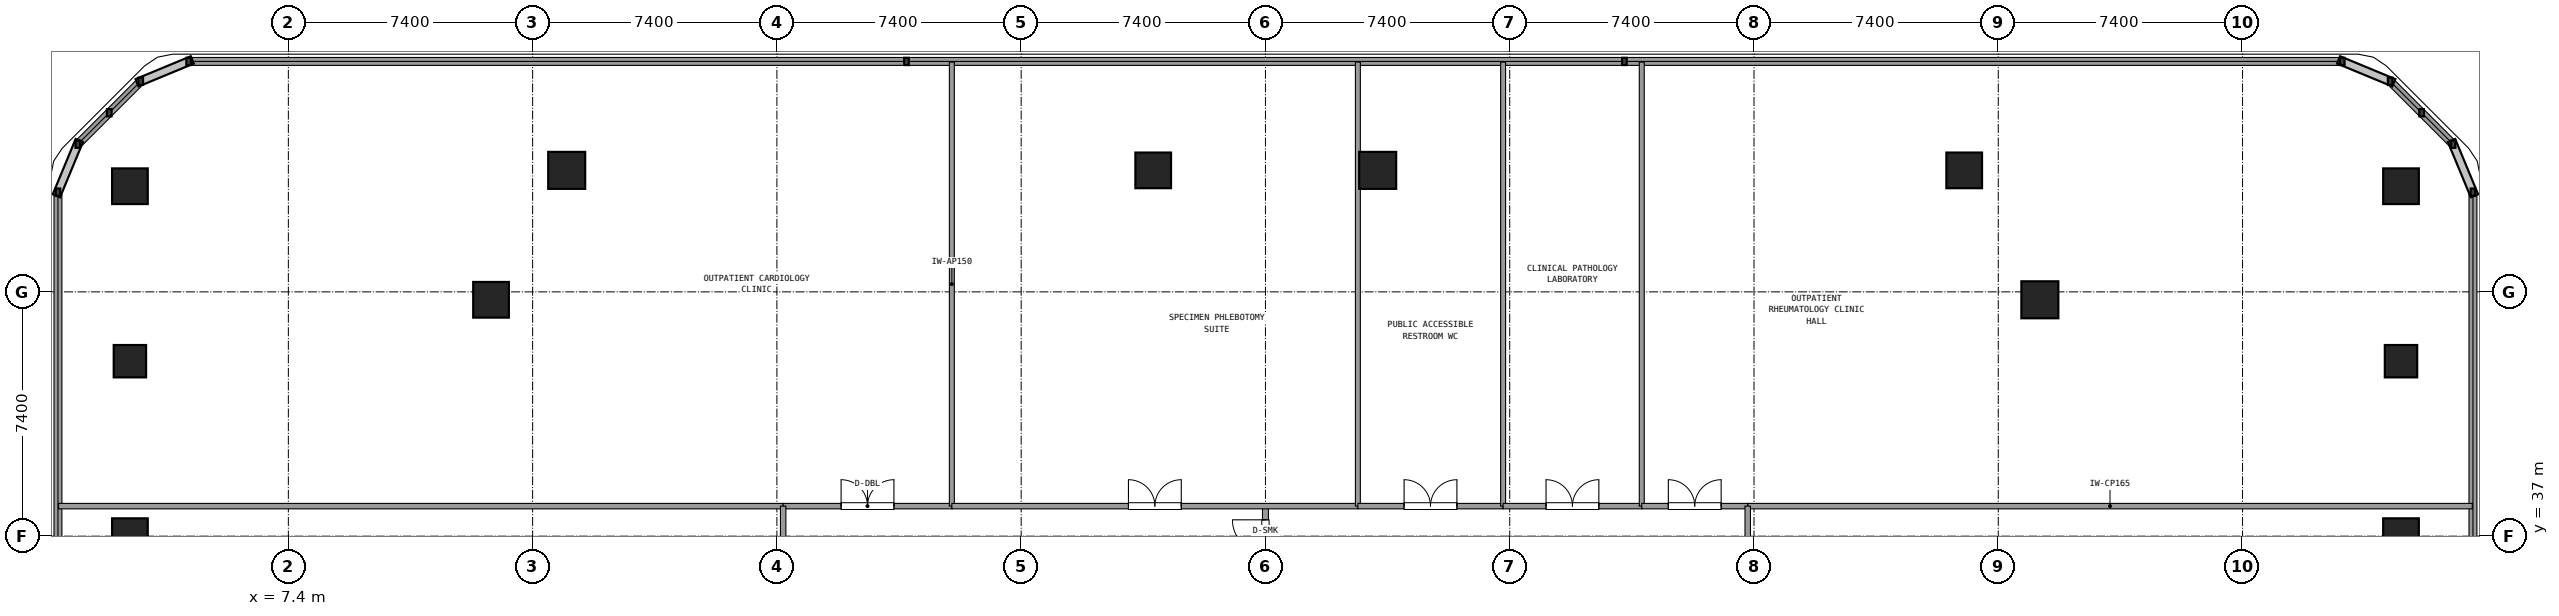
"""IFC4 building model, lengths in metres.
Left out: names, types, materials, properties, quantities, classifications, styles, units other than length and angle.
Written with IfcOpenShell. Run it as: python <this file> out.ifc"""

import sys

from ifc_helpers import new_model, si_unit, direction, frame, frame_2d, origin, origin_2d, place, context, subcontext, project, spatial, rectangle, circle, extrude, element, fill, save


model = new_model("IFC4")
c1 = context("Model", 3, precision=1e-05, world=origin(), true_north=direction((0.0, 1.0)))
c2 = subcontext(c1, "Body", "Model", "MODEL_VIEW")
j1 = project(units=[si_unit("LENGTHUNIT", "METRE"), si_unit("PLANEANGLEUNIT", "RADIAN")], contexts=[c1])
p1 = place(None, origin())
s1 = spatial("IfcSite", under=j1, at=p1, CompositionType="ELEMENT")
p2 = place(p1, origin())
s2 = spatial("IfcBuilding", under=s1, at=p2, CompositionType="ELEMENT")
p3 = place(p2, frame((0.0, 0.0, 5.4)))
s3 = spatial("IfcBuildingStorey", under=s2, at=p3, CompositionType="ELEMENT", Elevation=5.4)
p4 = place(p3, frame((60.46, 44.16, 0.0), z_axis=(0.0, 0.0, 1.0), x_axis=(1.0, 0.0, 0.0)))
e1 = element("IfcColumn", 1, at=p4, inside=s3, PredefinedType="COLUMN", context=c2, shape_type="SweptSolid", body=[
    extrude(circle(Radius=0.56, at=origin_2d()), origin(), (0.0, 0.0, 1.0), 4.5),
])
p5 = place(p3, frame((58.168, 48.08, 0.0), z_axis=(0.0, 0.0, 1.0), x_axis=(1.0, 0.0, 0.0)))
e2 = element("IfcColumn", 2, at=p5, inside=s3, PredefinedType="COLUMN", context=c2, shape_type="SweptSolid", body=[
    extrude(rectangle(XDim=1.08, YDim=1.08, at=origin_2d()), origin(), (0.0, 0.0, 1.0), 4.5),
])
p6 = place(p3, frame((40.4, 48.08, 0.0), z_axis=(0.0, 0.0, 1.0), x_axis=(1.0, 0.0, 0.0)))
e3 = element("IfcColumn", 3, at=p6, inside=s3, PredefinedType="COLUMN", context=c2, shape_type="SweptSolid", body=[
    extrude(circle(Radius=0.56, at=origin_2d()), origin(), (0.0, 0.0, 1.0), 4.5),
])
p7 = place(p3, frame((33.6, 48.08, 0.0), z_axis=(0.0, 0.0, 1.0), x_axis=(1.0, 0.0, 0.0)))
e4 = element("IfcColumn", 4, at=p7, inside=s3, PredefinedType="COLUMN", context=c2, shape_type="SweptSolid", body=[
    extrude(rectangle(XDim=1.08, YDim=1.08, at=origin_2d()), origin(), (0.0, 0.0, 1.0), 4.5),
])
p8 = place(p3, frame((15.832, 48.08, 0.0), z_axis=(0.0, 0.0, 1.0), x_axis=(1.0, 0.0, 0.0)))
e5 = element("IfcColumn", 5, at=p8, inside=s3, PredefinedType="COLUMN", context=c2, shape_type="SweptSolid", body=[
    extrude(circle(Radius=0.56, at=origin_2d()), origin(), (0.0, 0.0, 1.0), 4.5),
])
for number, where, z_axis, x_axis in (
    (6, (13.54, 44.16, 0.0), (0.0, 0.0, 1.0), (1.0, 0.0, 0.0)),
    (7, (2.6, 37.0, 0.0), (0.0, 0.0, 1.0), (1.0, 0.0, 0.0)),
    (8, (2.6, 47.6, 0.0), (0.0, 0.0, 1.0), (1.0, 0.0, 0.0)),
    (9, (71.4, 37.0, 0.0), (0.0, 0.0, 1.0), (1.0, 0.0, 0.0)),
    (10, (71.4, 47.6, 0.0), (0.0, 0.0, 1.0), (1.0, 0.0, 0.0)),
):
    element("IfcColumn", number, at=place(p3, frame(where, z_axis=z_axis, x_axis=x_axis)), inside=s3, PredefinedType="COLUMN", context=c2, shape_type="SweptSolid", body=[
        extrude(rectangle(XDim=1.08, YDim=1.08, at=origin_2d()), origin(), (0.0, 0.0, 1.0), 4.5),
    ])
for number, where, z_axis, x_axis in (
    (11, (2.6, 42.3, 0.0), (0.0, 0.0, 1.0), (1.0, 0.0, 0.0)),
    (12, (71.4, 42.3, 0.0), (0.0, 0.0, 1.0), (1.0, 0.0, 0.0)),
):
    element("IfcColumn", number, at=place(p3, frame(where, z_axis=z_axis, x_axis=x_axis)), inside=s3, PredefinedType="PILASTER", context=c2, shape_type="SweptSolid", body=[
        extrude(circle(Radius=0.49, at=origin_2d()), origin(), (0.0, 0.0, 1.0), 4.5),
    ])
p9 = place(p3, frame((73.58, 4.379, 0.0), z_axis=(0.0, 0.0, 1.0), x_axis=(0.0, 1.0, 0.0)))
e13 = element("IfcWall", 13, at=p9, inside=s3, PredefinedType="SOLIDWALL", context=c2, shape_type="SweptSolid", body=[
    extrude(rectangle(XDim=43.042, YDim=0.24, at=frame_2d((21.521, 0.0))), origin(), (0.0, 0.0, 1.0), 0.85),
])
p10 = place(p3, frame((72.979, 48.872, 0.0), z_axis=(0.0, 0.0, 1.0), x_axis=(-0.707106781187, 0.707106781187, 0.0)))
e14 = element("IfcWall", 14, at=p10, inside=s3, PredefinedType="SOLIDWALL", context=c2, shape_type="SweptSolid", body=[
    extrude(rectangle(XDim=2.697, YDim=0.24, at=frame_2d((1.348, 0.0))), origin(), (0.0, 0.0, 1.0), 0.85),
])
p11 = place(p3, frame((69.621, 51.38, 0.0), z_axis=(0.0, 0.0, 1.0), x_axis=(-1.0, 0.0, 0.0)))
e15 = element("IfcWall", 15, at=p11, inside=s3, PredefinedType="SOLIDWALL", context=c2, shape_type="SweptSolid", body=[
    extrude(rectangle(XDim=65.242, YDim=0.24, at=frame_2d((32.621, 0.0))), origin(), (0.0, 0.0, 1.0), 0.85),
])
p12 = place(p3, frame((2.928, 50.779, 0.0), z_axis=(0.0, 0.0, 1.0), x_axis=(-0.707106781187, -0.707106781187, 0.0)))
e16 = element("IfcWall", 16, at=p12, inside=s3, PredefinedType="SOLIDWALL", context=c2, shape_type="SweptSolid", body=[
    extrude(rectangle(XDim=2.697, YDim=0.24, at=frame_2d((1.348, 0.0))), origin(), (0.0, 0.0, 1.0), 0.85),
])
p13 = place(p3, frame((0.42, 47.421, 0.0), z_axis=(0.0, 0.0, 1.0), x_axis=(0.0, -1.0, 0.0)))
e17 = element("IfcWall", 17, at=p13, inside=s3, PredefinedType="SOLIDWALL", context=c2, shape_type="SweptSolid", body=[
    extrude(rectangle(XDim=43.042, YDim=0.24, at=frame_2d((21.521, 0.0))), origin(), (0.0, 0.0, 1.0), 0.85),
])
p14 = place(p3, frame((37.0, 35.08, 0.0), z_axis=(0.0, 0.0, 1.0), x_axis=(0.0, 1.0, 0.0)))
e18 = element("IfcWall", 18, at=p14, inside=s3, PredefinedType="PARTITIONING", context=c2, shape_type="SweptSolid", body=[
    extrude(rectangle(XDim=2.83, YDim=0.18, at=frame_2d((1.415, 0.0))), origin(), (0.0, 0.0, 1.0), 3.21),
])
p15 = place(p14, frame((0.415, 0.0, 0.0)))
e19 = element("IfcOpeningElement", 19, at=p15, cuts=e18, PredefinedType="OPENING", context=c2, shape_type="SweptSolid", body=[
    extrude(rectangle(XDim=2.0, YDim=2.2, at=frame_2d((1.0, 1.1))), frame((0.0, 0.1, 0.0), z_axis=(0.0, -1.0, 0.0), x_axis=(1.0, 0.0, 0.0)), (0.0, 0.0, 1.0), 0.2),
])
for number, where, z_axis, x_axis in (
    (20, (0.44, 37.91, 0.0), (0.0, 0.0, 1.0), (1.0, 0.0, 0.0)),
    (21, (51.61, 37.91, 0.0), (0.0, 0.0, 1.0), (1.0, 0.0, 0.0)),
):
    element("IfcWall", number, at=place(p3, frame(where, z_axis=z_axis, x_axis=x_axis)), inside=s3, PredefinedType="PARTITIONING", context=c2, shape_type="SweptSolid", body=[
        extrude(rectangle(XDim=21.95, YDim=0.165, at=frame_2d((10.975, 0.0))), origin(), (0.0, 0.0, 1.0), 3.21),
    ])
p16 = place(p3, frame((22.39, 37.91, 0.0), z_axis=(0.0, 0.0, 1.0), x_axis=(1.0, 0.0, 0.0)))
e22 = element("IfcWall", 22, at=p16, inside=s3, PredefinedType="PARTITIONING", context=c2, shape_type="SweptSolid", body=[
    extrude(rectangle(XDim=5.11, YDim=0.165, at=frame_2d((2.555, 0.0))), origin(), (0.0, 0.0, 1.0), 3.21),
])
p17 = place(p16, frame((1.755, 0.0, 0.0)))
e23 = element("IfcOpeningElement", 23, at=p17, cuts=e22, PredefinedType="OPENING", context=c2, shape_type="SweptSolid", body=[
    extrude(rectangle(XDim=1.6, YDim=2.2, at=frame_2d((0.8, 1.1))), frame((0.0, 0.093, 0.0), z_axis=(0.0, -1.0, 0.0), x_axis=(1.0, 0.0, 0.0)), (0.0, 0.0, 1.0), 0.185),
])
p18 = place(p3, frame((27.5, 37.91, 0.0), z_axis=(0.0, 0.0, 1.0), x_axis=(0.0, 1.0, 0.0)))
e24 = element("IfcWall", 24, at=p18, inside=s3, PredefinedType="PARTITIONING", context=c2, shape_type="SweptSolid", body=[
    extrude(rectangle(XDim=13.45, YDim=0.15, at=frame_2d((6.725, 0.0))), origin(), (0.0, 0.0, 1.0), 3.21),
])
p19 = place(p3, frame((27.5, 37.91, 0.0), z_axis=(0.0, 0.0, 1.0), x_axis=(1.0, 0.0, 0.0)))
e25 = element("IfcWall", 25, at=p19, inside=s3, PredefinedType="PARTITIONING", context=c2, shape_type="SweptSolid", body=[
    extrude(rectangle(XDim=12.3, YDim=0.165, at=frame_2d((6.15, 0.0))), origin(), (0.0, 0.0, 1.0), 3.21),
])
p20 = place(p19, frame((5.35, 0.0, 0.0)))
e26 = element("IfcOpeningElement", 26, at=p20, cuts=e25, PredefinedType="OPENING", context=c2, shape_type="SweptSolid", body=[
    extrude(rectangle(XDim=1.6, YDim=2.2, at=frame_2d((0.8, 1.1))), frame((0.0, 0.093, 0.0), z_axis=(0.0, -1.0, 0.0), x_axis=(1.0, 0.0, 0.0)), (0.0, 0.0, 1.0), 0.185),
])
p21 = place(p3, frame((39.8, 37.91, 0.0), z_axis=(0.0, 0.0, 1.0), x_axis=(0.0, 1.0, 0.0)))
e27 = element("IfcWall", 27, at=p21, inside=s3, PredefinedType="PARTITIONING", context=c2, shape_type="SweptSolid", body=[
    extrude(rectangle(XDim=13.45, YDim=0.15, at=frame_2d((6.725, 0.0))), origin(), (0.0, 0.0, 1.0), 3.21),
])
p22 = place(p3, frame((39.8, 37.91, 0.0), z_axis=(0.0, 0.0, 1.0), x_axis=(1.0, 0.0, 0.0)))
e28 = element("IfcWall", 28, at=p22, inside=s3, PredefinedType="PARTITIONING", context=c2, shape_type="SweptSolid", body=[
    extrude(rectangle(XDim=4.4, YDim=0.165, at=frame_2d((2.2, 0.0))), origin(), (0.0, 0.0, 1.0), 3.21),
])
p23 = place(p22, frame((1.4, 0.0, 0.0)))
e29 = element("IfcOpeningElement", 29, at=p23, cuts=e28, PredefinedType="OPENING", context=c2, shape_type="SweptSolid", body=[
    extrude(rectangle(XDim=1.6, YDim=2.2, at=frame_2d((0.8, 1.1))), frame((0.0, 0.093, 0.0), z_axis=(0.0, -1.0, 0.0), x_axis=(1.0, 0.0, 0.0)), (0.0, 0.0, 1.0), 0.185),
])
p24 = place(p3, frame((44.2, 37.91, 0.0), z_axis=(0.0, 0.0, 1.0), x_axis=(0.0, 1.0, 0.0)))
e30 = element("IfcWall", 30, at=p24, inside=s3, PredefinedType="PARTITIONING", context=c2, shape_type="SweptSolid", body=[
    extrude(rectangle(XDim=13.45, YDim=0.15, at=frame_2d((6.725, 0.0))), origin(), (0.0, 0.0, 1.0), 3.21),
])
p25 = place(p3, frame((44.2, 37.91, 0.0), z_axis=(0.0, 0.0, 1.0), x_axis=(1.0, 0.0, 0.0)))
e31 = element("IfcWall", 31, at=p25, inside=s3, PredefinedType="PARTITIONING", context=c2, shape_type="SweptSolid", body=[
    extrude(rectangle(XDim=4.2, YDim=0.165, at=frame_2d((2.1, 0.0))), origin(), (0.0, 0.0, 1.0), 3.21),
])
p26 = place(p25, frame((1.3, 0.0, 0.0)))
e32 = element("IfcOpeningElement", 32, at=p26, cuts=e31, PredefinedType="OPENING", context=c2, shape_type="SweptSolid", body=[
    extrude(rectangle(XDim=1.6, YDim=2.2, at=frame_2d((0.8, 1.1))), frame((0.0, 0.093, 0.0), z_axis=(0.0, -1.0, 0.0), x_axis=(1.0, 0.0, 0.0)), (0.0, 0.0, 1.0), 0.185),
])
p27 = place(p3, frame((48.4, 37.91, 0.0), z_axis=(0.0, 0.0, 1.0), x_axis=(0.0, 1.0, 0.0)))
e33 = element("IfcWall", 33, at=p27, inside=s3, PredefinedType="PARTITIONING", context=c2, shape_type="SweptSolid", body=[
    extrude(rectangle(XDim=13.45, YDim=0.15, at=frame_2d((6.725, 0.0))), origin(), (0.0, 0.0, 1.0), 3.21),
])
p28 = place(p3, frame((48.4, 37.91, 0.0), z_axis=(0.0, 0.0, 1.0), x_axis=(1.0, 0.0, 0.0)))
e34 = element("IfcWall", 34, at=p28, inside=s3, PredefinedType="PARTITIONING", context=c2, shape_type="SweptSolid", body=[
    extrude(rectangle(XDim=3.21, YDim=0.165, at=frame_2d((1.605, 0.0))), origin(), (0.0, 0.0, 1.0), 3.21),
])
p29 = place(p28, frame((0.805, 0.0, 0.0)))
e35 = element("IfcOpeningElement", 35, at=p29, cuts=e34, PredefinedType="OPENING", context=c2, shape_type="SweptSolid", body=[
    extrude(rectangle(XDim=1.6, YDim=2.2, at=frame_2d((0.8, 1.1))), frame((0.0, 0.093, 0.0), z_axis=(0.0, -1.0, 0.0), x_axis=(1.0, 0.0, 0.0)), (0.0, 0.0, 1.0), 0.185),
])
p30 = place(p3, frame((22.39, 29.5, 0.0), z_axis=(0.0, 0.0, 1.0), x_axis=(0.0, 1.0, 0.0)))
e36 = element("IfcWall", 36, at=p30, inside=s3, PredefinedType="PARTITIONING", context=c2, shape_type="SweptSolid", body=[
    extrude(rectangle(XDim=8.41, YDim=0.165, at=frame_2d((4.205, 0.0))), origin(), (0.0, 0.0, 1.0), 3.21),
])
p31 = place(p30, frame((3.405, 0.0, 0.0)))
e37 = element("IfcOpeningElement", 37, at=p31, cuts=e36, PredefinedType="OPENING", context=c2, shape_type="SweptSolid", body=[
    extrude(rectangle(XDim=1.6, YDim=2.2, at=frame_2d((0.8, 1.1))), frame((0.0, 0.093, 0.0), z_axis=(0.0, -1.0, 0.0), x_axis=(1.0, 0.0, 0.0)), (0.0, 0.0, 1.0), 0.185),
])
p32 = place(p3, frame((51.61, 29.5, 0.0), z_axis=(0.0, 0.0, 1.0), x_axis=(0.0, 1.0, 0.0)))
e38 = element("IfcWall", 38, at=p32, inside=s3, PredefinedType="PARTITIONING", context=c2, shape_type="SweptSolid", body=[
    extrude(rectangle(XDim=8.41, YDim=0.165, at=frame_2d((4.205, 0.0))), origin(), (0.0, 0.0, 1.0), 3.21),
])
p33 = place(p32, frame((3.405, 0.0, 0.0)))
e39 = element("IfcOpeningElement", 39, at=p33, cuts=e38, PredefinedType="OPENING", context=c2, shape_type="SweptSolid", body=[
    extrude(rectangle(XDim=1.6, YDim=2.2, at=frame_2d((0.8, 1.1))), frame((0.0, 0.093, 0.0), z_axis=(0.0, -1.0, 0.0), x_axis=(1.0, 0.0, 0.0)), (0.0, 0.0, 1.0), 0.185),
])
p34 = place(p15, origin())
e40 = element("IfcDoor", 40, at=p34, inside=s3, OperationType="DOUBLE_DOOR_SINGLE_SWING", PredefinedType="DOOR", context=c2, shape_type="SweptSolid", body=[
    extrude(rectangle(XDim=2.0, YDim=2.2, at=frame_2d((1.0, 1.1))), frame((0.0, 0.025, 0.0), z_axis=(0.0, -1.0, 0.0), x_axis=(1.0, 0.0, 0.0)), (0.0, 0.0, 1.0), 0.05),
])
fill(e19, e40)
p35 = place(p17, origin())
e41 = element("IfcDoor", 41, at=p35, inside=s3, OperationType="DOUBLE_DOOR_SINGLE_SWING", PredefinedType="DOOR", context=c2, shape_type="SweptSolid", body=[
    extrude(rectangle(XDim=1.6, YDim=2.2, at=frame_2d((0.8, 1.1))), frame((0.0, 0.025, 0.0), z_axis=(0.0, -1.0, 0.0), x_axis=(1.0, 0.0, 0.0)), (0.0, 0.0, 1.0), 0.05),
])
fill(e23, e41)
p36 = place(p20, origin())
e42 = element("IfcDoor", 42, at=p36, inside=s3, OperationType="DOUBLE_DOOR_SINGLE_SWING", PredefinedType="DOOR", context=c2, shape_type="SweptSolid", body=[
    extrude(rectangle(XDim=1.6, YDim=2.2, at=frame_2d((0.8, 1.1))), frame((0.0, 0.025, 0.0), z_axis=(0.0, -1.0, 0.0), x_axis=(1.0, 0.0, 0.0)), (0.0, 0.0, 1.0), 0.05),
])
fill(e26, e42)
p37 = place(p23, origin())
e43 = element("IfcDoor", 43, at=p37, inside=s3, OperationType="DOUBLE_DOOR_SINGLE_SWING", PredefinedType="DOOR", context=c2, shape_type="SweptSolid", body=[
    extrude(rectangle(XDim=1.6, YDim=2.2, at=frame_2d((0.8, 1.1))), frame((0.0, 0.025, 0.0), z_axis=(0.0, -1.0, 0.0), x_axis=(1.0, 0.0, 0.0)), (0.0, 0.0, 1.0), 0.05),
])
fill(e29, e43)
p38 = place(p26, origin())
e44 = element("IfcDoor", 44, at=p38, inside=s3, OperationType="DOUBLE_DOOR_SINGLE_SWING", PredefinedType="DOOR", context=c2, shape_type="SweptSolid", body=[
    extrude(rectangle(XDim=1.6, YDim=2.2, at=frame_2d((0.8, 1.1))), frame((0.0, 0.025, 0.0), z_axis=(0.0, -1.0, 0.0), x_axis=(1.0, 0.0, 0.0)), (0.0, 0.0, 1.0), 0.05),
])
fill(e32, e44)
p39 = place(p29, origin())
e45 = element("IfcDoor", 45, at=p39, inside=s3, OperationType="DOUBLE_DOOR_SINGLE_SWING", PredefinedType="DOOR", context=c2, shape_type="SweptSolid", body=[
    extrude(rectangle(XDim=1.6, YDim=2.2, at=frame_2d((0.8, 1.1))), frame((0.0, 0.025, 0.0), z_axis=(0.0, -1.0, 0.0), x_axis=(1.0, 0.0, 0.0)), (0.0, 0.0, 1.0), 0.05),
])
fill(e35, e45)
save(model, sys.argv[1])
